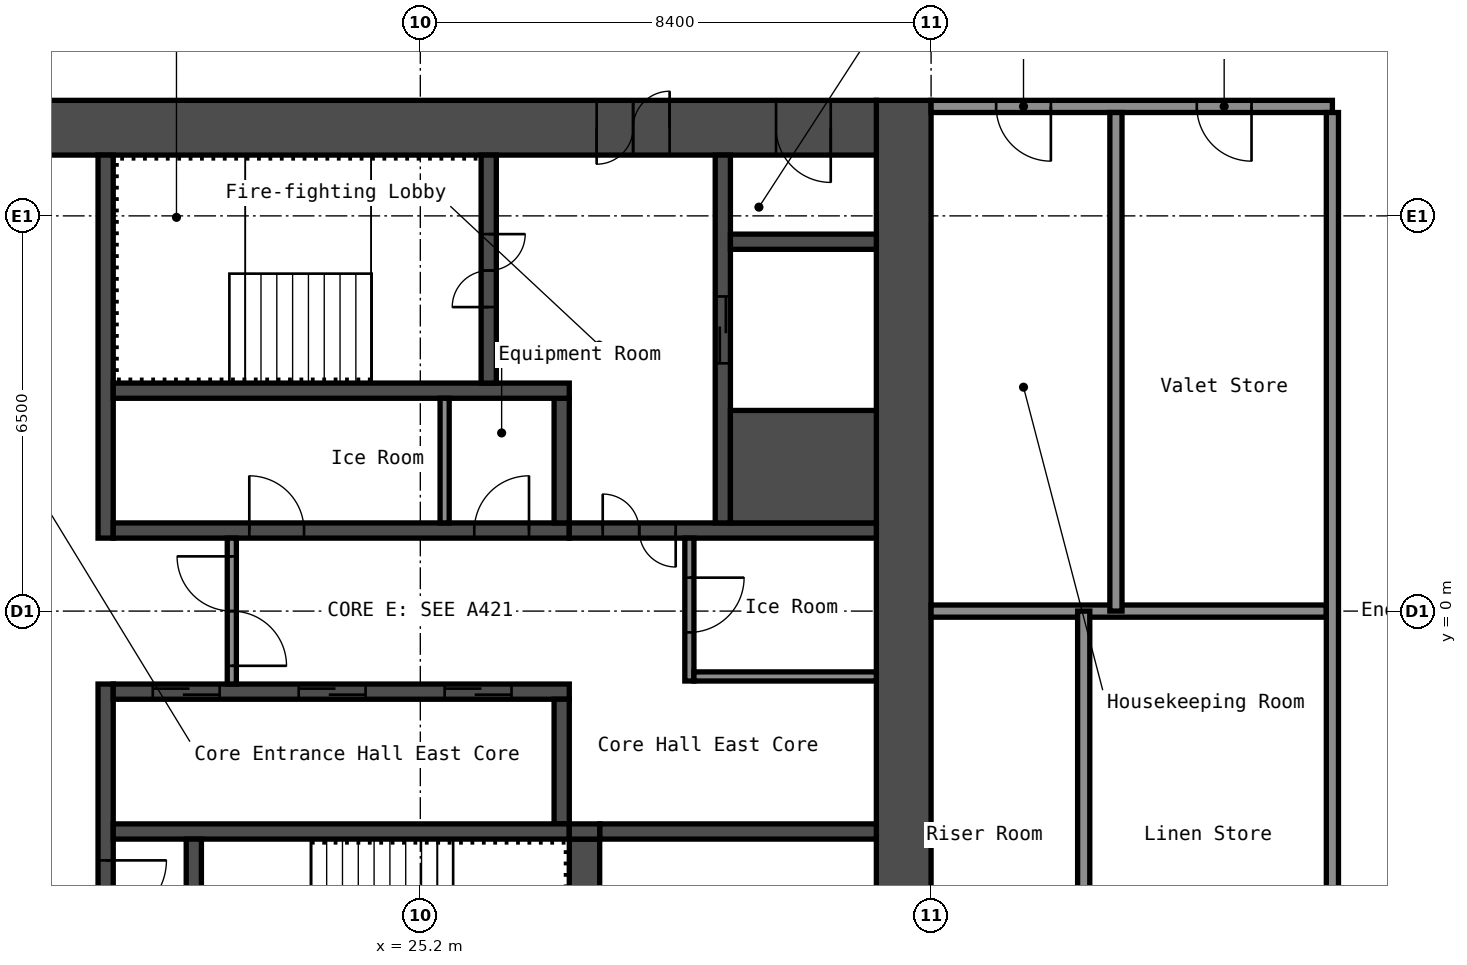
"""IFC4 building model, lengths in metres.
Left out: names, types, materials, properties, quantities, classifications, styles, units other than length and angle.
Written with IfcOpenShell. Run it as: python <this file> out.ifc"""

import sys

from ifc_helpers import new_model, si_unit, direction, frame, frame_2d, origin, place, context, subcontext, project, spatial, rectangle, extrude, element, fill, save


model = new_model("IFC4")
c1 = context("Model", 3, precision=1e-05, world=origin(), true_north=direction((0.0, 1.0)))
c2 = subcontext(c1, "Body", "Model", "MODEL_VIEW")
j1 = project(units=[si_unit("LENGTHUNIT", "METRE"), si_unit("PLANEANGLEUNIT", "RADIAN")], contexts=[c1])
p1 = place(None, origin())
s1 = spatial("IfcSite", under=j1, at=p1, CompositionType="ELEMENT")
p2 = place(p1, origin())
s2 = spatial("IfcBuilding", under=s1, at=p2, CompositionType="ELEMENT")
p3 = place(p2, frame((0.0, 0.0, 137.4)))
s3 = spatial("IfcBuildingStorey", under=s2, at=p3, CompositionType="ELEMENT", Elevation=137.4)
p4 = place(p3, frame((33.15, -8.4, 0.0), z_axis=(0.0, 0.0, 1.0), x_axis=(0.0, 1.0, 0.0)))
e1 = element("IfcWall", 1, at=p4, inside=s3, PredefinedType="SHEAR", context=c2, shape_type="SweptSolid", body=[
    extrude(rectangle(XDim=16.8, YDim=0.9, at=frame_2d((8.4, 0.0))), origin(), (0.0, 0.0, 1.0), 2.75),
])
p5 = place(p3, frame((17.7, 7.95, 0.0), z_axis=(0.0, 0.0, 1.0), x_axis=(1.0, 0.0, 0.0)))
e2 = element("IfcWall", 2, at=p5, inside=s3, PredefinedType="SHEAR", context=c2, shape_type="SweptSolid", body=[
    extrude(rectangle(XDim=15.0, YDim=0.9, at=frame_2d((7.5, 0.0))), origin(), (0.0, 0.0, 1.0), 2.75),
])
p6 = place(p5, frame((10.4, 0.0, 0.0)))
e3 = element("IfcOpeningElement", 3, at=p6, cuts=e2, PredefinedType="OPENING", context=c2, shape_type="SweptSolid", body=[
    extrude(rectangle(XDim=1.2, YDim=2.1, at=frame_2d((0.6, 1.05))), frame((0.0, 0.46, 0.0), z_axis=(0.0, -1.0, 0.0), x_axis=(1.0, 0.0, 0.0)), (0.0, 0.0, 1.0), 0.92),
])
p7 = place(p5, frame((13.35, 0.0, 0.0)))
e4 = element("IfcOpeningElement", 4, at=p7, cuts=e2, PredefinedType="OPENING", context=c2, shape_type="SweptSolid", body=[
    extrude(rectangle(XDim=0.9, YDim=2.1, at=frame_2d((0.45, 1.05))), frame((0.0, 0.46, 0.0), z_axis=(0.0, -1.0, 0.0), x_axis=(1.0, 0.0, 0.0)), (0.0, 0.0, 1.0), 0.92),
])
p8 = place(p3, frame((20.025, 1.2, 0.0), z_axis=(0.0, 0.0, 1.0), x_axis=(0.0, 1.0, 0.0)))
e5 = element("IfcWall", 5, at=p8, inside=s3, PredefinedType="SHEAR", context=c2, shape_type="SweptSolid", body=[
    extrude(rectangle(XDim=6.3, YDim=0.25, at=frame_2d((3.15, 0.0))), origin(), (0.0, 0.0, 1.0), 2.75),
])
p9 = place(p3, frame((20.025, -7.5, 0.0), z_axis=(0.0, 0.0, 1.0), x_axis=(0.0, 1.0, 0.0)))
e6 = element("IfcWall", 6, at=p9, inside=s3, PredefinedType="SHEAR", context=c2, shape_type="SweptSolid", body=[
    extrude(rectangle(XDim=6.3, YDim=0.25, at=frame_2d((3.15, 0.0))), origin(), (0.0, 0.0, 1.0), 2.75),
])
p10 = place(p9, frame((2.4, 0.0, 0.0)))
e7 = element("IfcOpeningElement", 7, at=p10, cuts=e6, PredefinedType="OPENING", context=c2, shape_type="SweptSolid", body=[
    extrude(rectangle(XDim=1.0, YDim=2.1, at=frame_2d((0.5, 1.05))), frame((0.0, 0.135, 0.0), z_axis=(0.0, -1.0, 0.0), x_axis=(1.0, 0.0, 0.0)), (0.0, 0.0, 1.0), 0.27),
])
p11 = place(p3, frame((20.15, 1.325, 0.0), z_axis=(0.0, 0.0, 1.0), x_axis=(1.0, 0.0, 0.0)))
e8 = element("IfcWall", 8, at=p11, inside=s3, PredefinedType="SHEAR", context=c2, shape_type="SweptSolid", body=[
    extrude(rectangle(XDim=7.5, YDim=0.25, at=frame_2d((3.75, 0.0))), origin(), (0.0, 0.0, 1.0), 2.75),
])
p12 = place(p11, frame((2.238, 0.0, 0.0)))
e9 = element("IfcOpeningElement", 9, at=p12, cuts=e8, PredefinedType="OPENING", context=c2, shape_type="SweptSolid", body=[
    extrude(rectangle(XDim=0.9, YDim=2.1, at=frame_2d((0.45, 1.05))), frame((0.0, 0.135, 0.0), z_axis=(0.0, -1.0, 0.0), x_axis=(1.0, 0.0, 0.0)), (0.0, 0.0, 1.0), 0.27),
])
p13 = place(p11, frame((5.938, 0.0, 0.0)))
e10 = element("IfcOpeningElement", 10, at=p13, cuts=e8, PredefinedType="OPENING", context=c2, shape_type="SweptSolid", body=[
    extrude(rectangle(XDim=0.9, YDim=2.1, at=frame_2d((0.45, 1.05))), frame((0.0, 0.135, 0.0), z_axis=(0.0, -1.0, 0.0), x_axis=(1.0, 0.0, 0.0)), (0.0, 0.0, 1.0), 0.27),
])
p14 = place(p3, frame((27.525, 1.45, 0.0), z_axis=(0.0, 0.0, 1.0), x_axis=(0.0, 1.0, 0.0)))
e11 = element("IfcWall", 11, at=p14, inside=s3, PredefinedType="SHEAR", context=c2, shape_type="SweptSolid", body=[
    extrude(rectangle(XDim=2.05, YDim=0.25, at=frame_2d((1.025, 0.0))), origin(), (0.0, 0.0, 1.0), 2.75),
])
p15 = place(p3, frame((20.15, 3.625, 0.0), z_axis=(0.0, 0.0, 1.0), x_axis=(1.0, 0.0, 0.0)))
e12 = element("IfcWall", 12, at=p15, inside=s3, PredefinedType="SHEAR", context=c2, shape_type="SweptSolid", body=[
    extrude(rectangle(XDim=7.5, YDim=0.25, at=frame_2d((3.75, 0.0))), origin(), (0.0, 0.0, 1.0), 2.75),
])
p16 = place(p3, frame((26.325, 3.75, 0.0), z_axis=(0.0, 0.0, 1.0), x_axis=(0.0, 1.0, 0.0)))
e13 = element("IfcWall", 13, at=p16, inside=s3, PredefinedType="SHEAR", context=c2, shape_type="SweptSolid", body=[
    extrude(rectangle(XDim=3.75, YDim=0.25, at=frame_2d((1.875, 0.0))), origin(), (0.0, 0.0, 1.0), 2.75),
])
p17 = place(p16, frame((1.25, 0.0, 0.0)))
e14 = element("IfcOpeningElement", 14, at=p17, cuts=e13, PredefinedType="OPENING", context=c2, shape_type="SweptSolid", body=[
    extrude(rectangle(XDim=1.2, YDim=2.1, at=frame_2d((0.6, 1.05))), frame((0.0, 0.135, 0.0), z_axis=(0.0, -1.0, 0.0), x_axis=(1.0, 0.0, 0.0)), (0.0, 0.0, 1.0), 0.27),
])
p18 = place(p3, frame((27.65, 1.325, 0.0), z_axis=(0.0, 0.0, 1.0), x_axis=(1.0, 0.0, 0.0)))
e15 = element("IfcWall", 15, at=p18, inside=s3, PredefinedType="SHEAR", context=c2, shape_type="SweptSolid", body=[
    extrude(rectangle(XDim=5.05, YDim=0.25, at=frame_2d((2.525, 0.0))), origin(), (0.0, 0.0, 1.0), 2.75),
])
p19 = place(p18, frame((0.55, 0.0, 0.0)))
e16 = element("IfcOpeningElement", 16, at=p19, cuts=e15, PredefinedType="OPENING", context=c2, shape_type="SweptSolid", body=[
    extrude(rectangle(XDim=1.2, YDim=2.1, at=frame_2d((0.6, 1.05))), frame((0.0, 0.135, 0.0), z_axis=(0.0, -1.0, 0.0), x_axis=(1.0, 0.0, 0.0)), (0.0, 0.0, 1.0), 0.27),
])
p20 = place(p3, frame((30.175, 1.45, 0.0), z_axis=(0.0, 0.0, 1.0), x_axis=(0.0, 1.0, 0.0)))
e17 = element("IfcWall", 17, at=p20, inside=s3, PredefinedType="SHEAR", context=c2, shape_type="SweptSolid", body=[
    extrude(rectangle(XDim=6.05, YDim=0.25, at=frame_2d((3.025, 0.0))), origin(), (0.0, 0.0, 1.0), 2.75),
])
p21 = place(p20, frame((2.625, 0.0, 0.0)))
e18 = element("IfcOpeningElement", 18, at=p21, cuts=e17, PredefinedType="OPENING", context=c2, shape_type="SweptSolid", body=[
    extrude(rectangle(XDim=1.1, YDim=2.1, at=frame_2d((0.55, 1.05))), frame((0.0, 0.135, 0.0), z_axis=(0.0, -1.0, 0.0), x_axis=(1.0, 0.0, 0.0)), (0.0, 0.0, 1.0), 0.27),
])
p22 = place(p3, frame((30.3, 2.375, 0.0), z_axis=(0.0, 0.0, 1.0), x_axis=(1.0, 0.0, 0.0)))
e19 = element("IfcWall", 19, at=p22, inside=s3, PredefinedType="SHEAR", context=c2, shape_type="SweptSolid", body=[
    extrude(rectangle(XDim=2.4, YDim=1.85, at=frame_2d((1.2, 0.0))), origin(), (0.0, 0.0, 1.0), 2.75),
])
p23 = place(p3, frame((30.3, 6.075, 0.0), z_axis=(0.0, 0.0, 1.0), x_axis=(1.0, 0.0, 0.0)))
e20 = element("IfcWall", 20, at=p23, inside=s3, PredefinedType="SHEAR", context=c2, shape_type="SweptSolid", body=[
    extrude(rectangle(XDim=2.4, YDim=0.25, at=frame_2d((1.2, 0.0))), origin(), (0.0, 0.0, 1.0), 2.75),
])
p24 = place(p3, frame((20.15, -1.325, 0.0), z_axis=(0.0, 0.0, 1.0), x_axis=(1.0, 0.0, 0.0)))
e21 = element("IfcWall", 21, at=p24, inside=s3, PredefinedType="SHEAR", context=c2, shape_type="SweptSolid", body=[
    extrude(rectangle(XDim=7.5, YDim=0.25, at=frame_2d((3.75, 0.0))), origin(), (0.0, 0.0, 1.0), 2.75),
])
p25 = place(p24, frame((0.65, 0.0, 0.0)))
e22 = element("IfcOpeningElement", 22, at=p25, cuts=e21, PredefinedType="OPENING", context=c2, shape_type="SweptSolid", body=[
    extrude(rectangle(XDim=1.1, YDim=2.1, at=frame_2d((0.55, 1.05))), frame((0.0, 0.135, 0.0), z_axis=(0.0, -1.0, 0.0), x_axis=(1.0, 0.0, 0.0)), (0.0, 0.0, 1.0), 0.27),
])
p26 = place(p24, frame((3.05, 0.0, 0.0)))
e23 = element("IfcOpeningElement", 23, at=p26, cuts=e21, PredefinedType="OPENING", context=c2, shape_type="SweptSolid", body=[
    extrude(rectangle(XDim=1.1, YDim=2.1, at=frame_2d((0.55, 1.05))), frame((0.0, 0.135, 0.0), z_axis=(0.0, -1.0, 0.0), x_axis=(1.0, 0.0, 0.0)), (0.0, 0.0, 1.0), 0.27),
])
p27 = place(p24, frame((5.45, 0.0, 0.0)))
e24 = element("IfcOpeningElement", 24, at=p27, cuts=e21, PredefinedType="OPENING", context=c2, shape_type="SweptSolid", body=[
    extrude(rectangle(XDim=1.1, YDim=2.1, at=frame_2d((0.55, 1.05))), frame((0.0, 0.135, 0.0), z_axis=(0.0, -1.0, 0.0), x_axis=(1.0, 0.0, 0.0)), (0.0, 0.0, 1.0), 0.27),
])
p28 = place(p3, frame((27.525, -3.5, 0.0), z_axis=(0.0, 0.0, 1.0), x_axis=(0.0, 1.0, 0.0)))
e25 = element("IfcWall", 25, at=p28, inside=s3, PredefinedType="SHEAR", context=c2, shape_type="SweptSolid", body=[
    extrude(rectangle(XDim=2.05, YDim=0.25, at=frame_2d((1.025, 0.0))), origin(), (0.0, 0.0, 1.0), 2.75),
])
p29 = place(p3, frame((20.15, -3.625, 0.0), z_axis=(0.0, 0.0, 1.0), x_axis=(1.0, 0.0, 0.0)))
e26 = element("IfcWall", 26, at=p29, inside=s3, PredefinedType="SHEAR", context=c2, shape_type="SweptSolid", body=[
    extrude(rectangle(XDim=7.5, YDim=0.25, at=frame_2d((3.75, 0.0))), origin(), (0.0, 0.0, 1.0), 2.75),
])
p30 = place(p3, frame((21.475, -7.5, 0.0), z_axis=(0.0, 0.0, 1.0), x_axis=(0.0, 1.0, 0.0)))
e27 = element("IfcWall", 27, at=p30, inside=s3, PredefinedType="SHEAR", context=c2, shape_type="SweptSolid", body=[
    extrude(rectangle(XDim=3.75, YDim=0.25, at=frame_2d((1.875, 0.0))), origin(), (0.0, 0.0, 1.0), 2.75),
])
p31 = place(p30, frame((1.3, 0.0, 0.0)))
e28 = element("IfcOpeningElement", 28, at=p31, cuts=e27, PredefinedType="OPENING", context=c2, shape_type="SweptSolid", body=[
    extrude(rectangle(XDim=1.2, YDim=2.1, at=frame_2d((0.6, 1.05))), frame((0.0, 0.135, 0.0), z_axis=(0.0, -1.0, 0.0), x_axis=(1.0, 0.0, 0.0)), (0.0, 0.0, 1.0), 0.27),
])
p32 = place(p3, frame((27.9, -7.5, 0.0), z_axis=(0.0, 0.0, 1.0), x_axis=(0.0, 1.0, 0.0)))
e29 = element("IfcWall", 29, at=p32, inside=s3, PredefinedType="SHEAR", context=c2, shape_type="SweptSolid", body=[
    extrude(rectangle(XDim=3.75, YDim=0.5, at=frame_2d((1.875, 0.0))), origin(), (0.0, 0.0, 1.0), 2.75),
])
p33 = place(p3, frame((28.15, -3.625, 0.0), z_axis=(0.0, 0.0, 1.0), x_axis=(1.0, 0.0, 0.0)))
e30 = element("IfcWall", 30, at=p33, inside=s3, PredefinedType="SHEAR", context=c2, shape_type="SweptSolid", body=[
    extrude(rectangle(XDim=4.55, YDim=0.25, at=frame_2d((2.275, 0.0))), origin(), (0.0, 0.0, 1.0), 2.75),
])
p34 = place(p3, frame((27.65, -3.625, 0.0), z_axis=(0.0, 0.0, 1.0), x_axis=(1.0, 0.0, 0.0)))
e31 = element("IfcWall", 31, at=p34, inside=s3, PredefinedType="SHEAR", context=c2, shape_type="SweptSolid", body=[
    extrude(rectangle(XDim=0.5, YDim=0.25, at=frame_2d((0.25, 0.0))), origin(), (0.0, 0.0, 1.0), 2.75),
])
p35 = place(p3, frame((22.1, -1.2, 0.0), z_axis=(0.0, 0.0, 1.0), x_axis=(0.0, 1.0, 0.0)))
e32 = element("IfcWall", 32, at=p35, inside=s3, PredefinedType="PARTITIONING", context=c2, shape_type="SweptSolid", body=[
    extrude(rectangle(XDim=2.4, YDim=0.15, at=frame_2d((1.2, 0.0))), origin(), (0.0, 0.0, 1.0), 2.75),
])
p36 = place(p35, frame((0.3, 0.0, 0.0)))
e33 = element("IfcOpeningElement", 33, at=p36, cuts=e32, PredefinedType="OPENING", context=c2, shape_type="SweptSolid", body=[
    extrude(rectangle(XDim=1.8, YDim=2.1, at=frame_2d((0.9, 1.05))), frame((0.0, 0.085, 0.0), z_axis=(0.0, -1.0, 0.0), x_axis=(1.0, 0.0, 0.0)), (0.0, 0.0, 1.0), 0.17),
])
p37 = place(p3, frame((29.625, -1.15, 0.0), z_axis=(0.0, 0.0, 1.0), x_axis=(0.0, 1.0, 0.0)))
e34 = element("IfcWall", 34, at=p37, inside=s3, PredefinedType="PARTITIONING", context=c2, shape_type="SweptSolid", body=[
    extrude(rectangle(XDim=2.35, YDim=0.15, at=frame_2d((1.175, 0.0))), origin(), (0.0, 0.0, 1.0), 2.75),
])
p38 = place(p37, frame((0.8, 0.0, 0.0)))
e35 = element("IfcOpeningElement", 35, at=p38, cuts=e34, PredefinedType="OPENING", context=c2, shape_type="SweptSolid", body=[
    extrude(rectangle(XDim=0.9, YDim=2.1, at=frame_2d((0.45, 1.05))), frame((0.0, 0.085, 0.0), z_axis=(0.0, -1.0, 0.0), x_axis=(1.0, 0.0, 0.0)), (0.0, 0.0, 1.0), 0.17),
])
p39 = place(p3, frame((29.7, -1.075, 0.0), z_axis=(0.0, 0.0, 1.0), x_axis=(1.0, 0.0, 0.0)))
e36 = element("IfcWall", 36, at=p39, inside=s3, PredefinedType="PARTITIONING", context=c2, shape_type="SweptSolid", body=[
    extrude(rectangle(XDim=3.0, YDim=0.15, at=frame_2d((1.5, 0.0))), origin(), (0.0, 0.0, 1.0), 2.75),
])
p40 = place(p3, frame((25.6, 1.45, 0.0), z_axis=(0.0, 0.0, 1.0), x_axis=(0.0, 1.0, 0.0)))
e37 = element("IfcWall", 37, at=p40, inside=s3, PredefinedType="PARTITIONING", context=c2, shape_type="SweptSolid", body=[
    extrude(rectangle(XDim=2.05, YDim=0.15, at=frame_2d((1.025, 0.0))), origin(), (0.0, 0.0, 1.0), 2.75),
])
p41 = place(p3, frame((33.6, 0.0, 0.0), z_axis=(0.0, 0.0, 1.0), x_axis=(1.0, 0.0, 0.0)))
e38 = element("IfcWall", 38, at=p41, inside=s3, PredefinedType="PARTITIONING", context=c2, shape_type="SweptSolid", body=[
    extrude(rectangle(XDim=6.5, YDim=0.2, at=frame_2d((3.25, 0.0))), origin(), (0.0, 0.0, 1.0), 2.75),
])
p42 = place(p3, frame((33.6, 8.3, 0.0), z_axis=(0.0, 0.0, 1.0), x_axis=(1.0, 0.0, 0.0)))
e39 = element("IfcWall", 39, at=p42, inside=s3, PredefinedType="PARTITIONING", context=c2, shape_type="SweptSolid", body=[
    extrude(rectangle(XDim=6.6, YDim=0.2, at=frame_2d((3.3, 0.0))), origin(), (0.0, 0.0, 1.0), 2.75),
])
p43 = place(p42, frame((1.07, 0.0, 0.0)))
e40 = element("IfcOpeningElement", 40, at=p43, cuts=e39, PredefinedType="OPENING", context=c2, shape_type="SweptSolid", body=[
    extrude(rectangle(XDim=0.9, YDim=2.1, at=frame_2d((0.45, 1.05))), frame((0.0, 0.11, 0.0), z_axis=(0.0, -1.0, 0.0), x_axis=(1.0, 0.0, 0.0)), (0.0, 0.0, 1.0), 0.22),
])
p44 = place(p42, frame((4.37, 0.0, 0.0)))
e41 = element("IfcOpeningElement", 41, at=p44, cuts=e39, PredefinedType="OPENING", context=c2, shape_type="SweptSolid", body=[
    extrude(rectangle(XDim=0.9, YDim=2.1, at=frame_2d((0.45, 1.05))), frame((0.0, 0.11, 0.0), z_axis=(0.0, -1.0, 0.0), x_axis=(1.0, 0.0, 0.0)), (0.0, 0.0, 1.0), 0.22),
])
for number, where, z_axis, x_axis in (
    (42, (36.11, -8.2, 0.0), (0.0, 0.0, 1.0), (0.0, 1.0, 0.0)),
    (43, (36.64, 0.0, 0.0), (0.0, 0.0, 1.0), (0.0, 1.0, 0.0)),
):
    element("IfcWall", number, at=place(p3, frame(where, z_axis=z_axis, x_axis=x_axis)), inside=s3, PredefinedType="PARTITIONING", context=c2, shape_type="SweptSolid", body=[
        extrude(rectangle(XDim=8.2, YDim=0.2, at=frame_2d((4.1, 0.0))), origin(), (0.0, 0.0, 1.0), 2.75),
    ])
p45 = place(p3, frame((40.2, -8.2, 0.0), z_axis=(0.0, 0.0, 1.0), x_axis=(0.0, 1.0, 0.0)))
e44 = element("IfcWall", 44, at=p45, inside=s3, PredefinedType="PARTITIONING", context=c2, shape_type="SweptSolid", body=[
    extrude(rectangle(XDim=16.4, YDim=0.2, at=frame_2d((8.2, 0.0))), origin(), (0.0, 0.0, 1.0), 2.75),
])
p46 = place(p6, origin())
e45 = element("IfcDoor", 45, at=p46, inside=s3, OperationType="DOUBLE_DOOR_SINGLE_SWING", PredefinedType="DOOR", context=c2, shape_type="SweptSolid", body=[
    extrude(rectangle(XDim=1.2, YDim=2.1, at=frame_2d((0.6, 1.05))), frame((0.0, 0.025, 0.0), z_axis=(0.0, -1.0, 0.0), x_axis=(1.0, 0.0, 0.0)), (0.0, 0.0, 1.0), 0.05),
])
fill(e3, e45)
p47 = place(p7, origin())
e46 = element("IfcDoor", 46, at=p47, inside=s3, OperationType="SINGLE_SWING_RIGHT", PredefinedType="DOOR", context=c2, shape_type="SweptSolid", body=[
    extrude(rectangle(XDim=0.9, YDim=2.1, at=frame_2d((0.45, 1.05))), frame((0.0, 0.025, 0.0), z_axis=(0.0, -1.0, 0.0), x_axis=(1.0, 0.0, 0.0)), (0.0, 0.0, 1.0), 0.05),
])
fill(e4, e46)
p48 = place(p17, origin())
e47 = element("IfcDoor", 47, at=p48, inside=s3, OperationType="DOUBLE_DOOR_SINGLE_SWING", PredefinedType="DOOR", context=c2, shape_type="SweptSolid", body=[
    extrude(rectangle(XDim=1.2, YDim=2.1, at=frame_2d((0.6, 1.05))), frame((0.0, 0.025, 0.0), z_axis=(0.0, -1.0, 0.0), x_axis=(1.0, 0.0, 0.0)), (0.0, 0.0, 1.0), 0.05),
])
fill(e14, e47)
p49 = place(p10, origin())
e48 = element("IfcDoor", 48, at=p49, inside=s3, OperationType="SINGLE_SWING_RIGHT", PredefinedType="DOOR", context=c2, shape_type="SweptSolid", body=[
    extrude(rectangle(XDim=1.0, YDim=2.1, at=frame_2d((0.5, 1.05))), frame((0.0, 0.025, 0.0), z_axis=(0.0, -1.0, 0.0), x_axis=(1.0, 0.0, 0.0)), (0.0, 0.0, 1.0), 0.05),
])
fill(e7, e48)
p50 = place(p19, origin())
e49 = element("IfcDoor", 49, at=p50, inside=s3, OperationType="DOUBLE_DOOR_SINGLE_SWING", PredefinedType="DOOR", context=c2, shape_type="SweptSolid", body=[
    extrude(rectangle(XDim=1.2, YDim=2.1, at=frame_2d((0.6, 1.05))), frame((0.0, 0.025, 0.0), z_axis=(0.0, -1.0, 0.0), x_axis=(1.0, 0.0, 0.0)), (0.0, 0.0, 1.0), 0.05),
])
fill(e16, e49)
p51 = place(p36, origin())
e50 = element("IfcDoor", 50, at=p51, inside=s3, OperationType="DOUBLE_DOOR_SINGLE_SWING", PredefinedType="DOOR", context=c2, shape_type="SweptSolid", body=[
    extrude(rectangle(XDim=1.8, YDim=2.1, at=frame_2d((0.9, 1.05))), frame((0.0, 0.025, 0.0), z_axis=(0.0, -1.0, 0.0), x_axis=(1.0, 0.0, 0.0)), (0.0, 0.0, 1.0), 0.05),
])
fill(e33, e50)
p52 = place(p38, origin())
e51 = element("IfcDoor", 51, at=p52, inside=s3, OperationType="SINGLE_SWING_RIGHT", PredefinedType="DOOR", context=c2, shape_type="SweptSolid", body=[
    extrude(rectangle(XDim=0.9, YDim=2.1, at=frame_2d((0.45, 1.05))), frame((0.0, 0.025, 0.0), z_axis=(0.0, -1.0, 0.0), x_axis=(1.0, 0.0, 0.0)), (0.0, 0.0, 1.0), 0.05),
])
fill(e35, e51)
p53 = place(p12, origin())
e52 = element("IfcDoor", 52, at=p53, inside=s3, OperationType="SINGLE_SWING_RIGHT", PredefinedType="DOOR", context=c2, shape_type="SweptSolid", body=[
    extrude(rectangle(XDim=0.9, YDim=2.1, at=frame_2d((0.45, 1.05))), frame((0.0, 0.025, 0.0), z_axis=(0.0, -1.0, 0.0), x_axis=(1.0, 0.0, 0.0)), (0.0, 0.0, 1.0), 0.05),
])
fill(e9, e52)
p54 = place(p13, origin())
e53 = element("IfcDoor", 53, at=p54, inside=s3, OperationType="SINGLE_SWING_LEFT", PredefinedType="DOOR", context=c2, shape_type="SweptSolid", body=[
    extrude(rectangle(XDim=0.9, YDim=2.1, at=frame_2d((0.45, 1.05))), frame((0.0, 0.025, 0.0), z_axis=(0.0, -1.0, 0.0), x_axis=(1.0, 0.0, 0.0)), (0.0, 0.0, 1.0), 0.05),
])
fill(e10, e53)
p55 = place(p25, origin())
e54 = element("IfcDoor", 54, at=p55, inside=s3, OperationType="DOUBLE_DOOR_SLIDING", PredefinedType="DOOR", context=c2, shape_type="SweptSolid", body=[
    extrude(rectangle(XDim=1.1, YDim=2.1, at=frame_2d((0.55, 1.05))), frame((0.0, 0.025, 0.0), z_axis=(0.0, -1.0, 0.0), x_axis=(1.0, 0.0, 0.0)), (0.0, 0.0, 1.0), 0.05),
])
fill(e22, e54)
p56 = place(p26, origin())
e55 = element("IfcDoor", 55, at=p56, inside=s3, OperationType="DOUBLE_DOOR_SLIDING", PredefinedType="DOOR", context=c2, shape_type="SweptSolid", body=[
    extrude(rectangle(XDim=1.1, YDim=2.1, at=frame_2d((0.55, 1.05))), frame((0.0, 0.025, 0.0), z_axis=(0.0, -1.0, 0.0), x_axis=(1.0, 0.0, 0.0)), (0.0, 0.0, 1.0), 0.05),
])
fill(e23, e55)
p57 = place(p27, origin())
e56 = element("IfcDoor", 56, at=p57, inside=s3, OperationType="DOUBLE_DOOR_SLIDING", PredefinedType="DOOR", context=c2, shape_type="SweptSolid", body=[
    extrude(rectangle(XDim=1.1, YDim=2.1, at=frame_2d((0.55, 1.05))), frame((0.0, 0.025, 0.0), z_axis=(0.0, -1.0, 0.0), x_axis=(1.0, 0.0, 0.0)), (0.0, 0.0, 1.0), 0.05),
])
fill(e24, e56)
p58 = place(p21, origin())
e57 = element("IfcDoor", 57, at=p58, inside=s3, OperationType="DOUBLE_DOOR_SLIDING", PredefinedType="DOOR", context=c2, shape_type="SweptSolid", body=[
    extrude(rectangle(XDim=1.1, YDim=2.1, at=frame_2d((0.55, 1.05))), frame((0.0, 0.025, 0.0), z_axis=(0.0, -1.0, 0.0), x_axis=(1.0, 0.0, 0.0)), (0.0, 0.0, 1.0), 0.05),
])
fill(e18, e57)
p59 = place(p43, origin())
e58 = element("IfcDoor", 58, at=p59, inside=s3, OperationType="SINGLE_SWING_RIGHT", PredefinedType="DOOR", context=c2, shape_type="SweptSolid", body=[
    extrude(rectangle(XDim=0.9, YDim=2.1, at=frame_2d((0.45, 1.05))), frame((0.0, 0.025, 0.0), z_axis=(0.0, -1.0, 0.0), x_axis=(1.0, 0.0, 0.0)), (0.0, 0.0, 1.0), 0.05),
])
fill(e40, e58)
p60 = place(p44, origin())
e59 = element("IfcDoor", 59, at=p60, inside=s3, OperationType="SINGLE_SWING_RIGHT", PredefinedType="DOOR", context=c2, shape_type="SweptSolid", body=[
    extrude(rectangle(XDim=0.9, YDim=2.1, at=frame_2d((0.45, 1.05))), frame((0.0, 0.025, 0.0), z_axis=(0.0, -1.0, 0.0), x_axis=(1.0, 0.0, 0.0)), (0.0, 0.0, 1.0), 0.05),
])
fill(e41, e59)
save(model, sys.argv[1])
